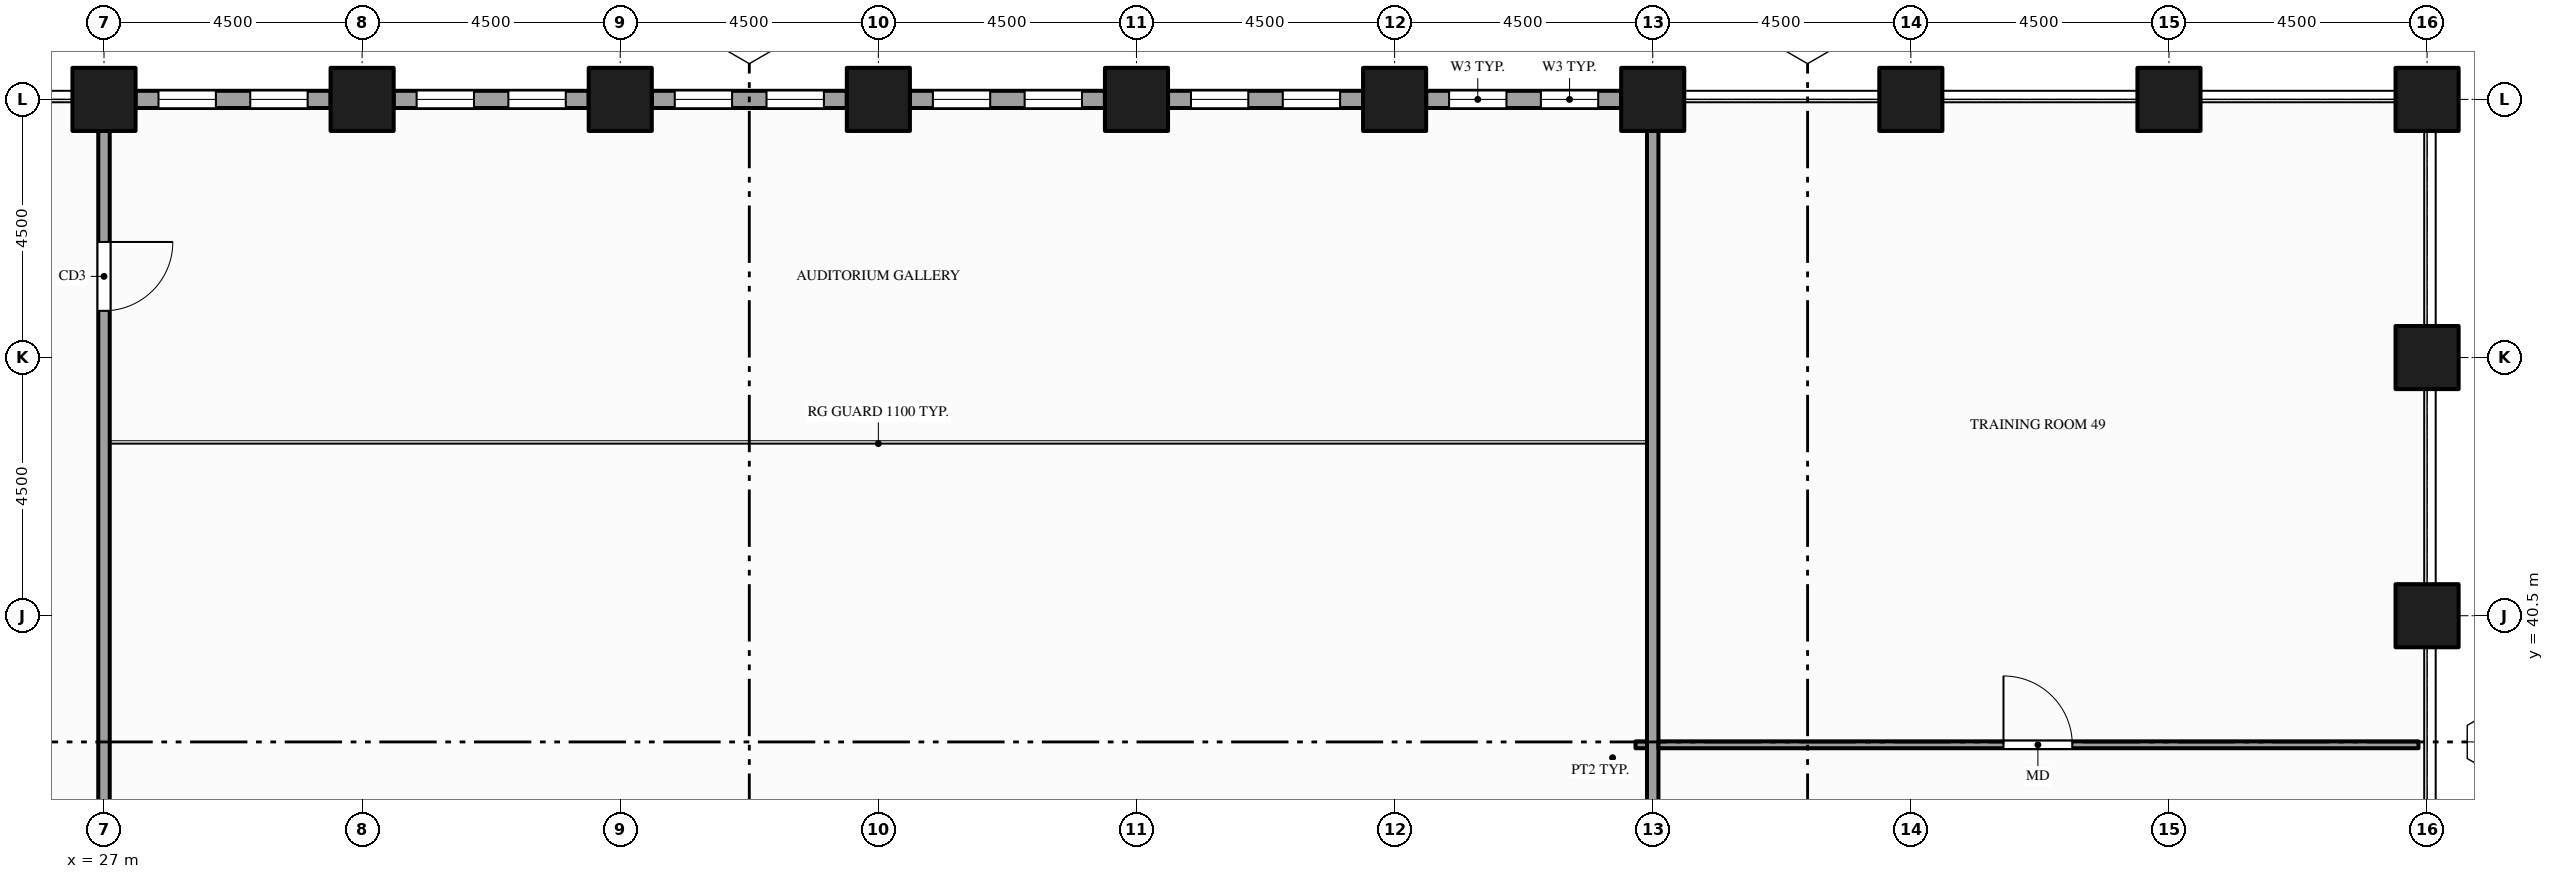
"""IFC4 building model, lengths in metres.
Left out: names, types, materials, properties, quantities, classifications, styles, units other than length and angle.
Written with IfcOpenShell. Run it as: python <this file> out.ifc"""

import sys

from ifc_helpers import new_model, si_unit, direction, frame, frame_2d, origin, origin_2d, place, context, subcontext, project, spatial, rectangle, hollow_rectangle, extrude, element, fill, save


model = new_model("IFC4")
c1 = context("Model", 3, precision=1e-05, world=origin(), true_north=direction((0.0, 1.0)))
c2 = subcontext(c1, "Body", "Model", "MODEL_VIEW")
j1 = project(units=[si_unit("LENGTHUNIT", "METRE"), si_unit("PLANEANGLEUNIT", "RADIAN")], contexts=[c1])
p1 = place(None, origin())
s1 = spatial("IfcSite", under=j1, at=p1, CompositionType="ELEMENT")
p2 = place(p1, origin())
s2 = spatial("IfcBuilding", under=s1, at=p2, CompositionType="ELEMENT")
p3 = place(p2, frame((0.0, 0.0, 14.0)))
s3 = spatial("IfcBuildingStorey", under=s2, at=p3, CompositionType="ELEMENT", Elevation=14.0)
for number, where, z_axis, x_axis in (
    (1, (27.0, 49.5, -0.25), (0.0, 0.0, 1.0), (1.0, 0.0, 0.0)),
    (2, (31.5, 49.5, -0.25), (0.0, 0.0, 1.0), (1.0, 0.0, 0.0)),
    (3, (36.0, 49.5, -0.25), (0.0, 0.0, 1.0), (1.0, 0.0, 0.0)),
    (4, (40.5, 49.5, -0.25), (0.0, 0.0, 1.0), (1.0, 0.0, 0.0)),
    (5, (45.0, 49.5, -0.25), (0.0, 0.0, 1.0), (1.0, 0.0, 0.0)),
    (6, (49.5, 49.5, -0.25), (0.0, 0.0, 1.0), (1.0, 0.0, 0.0)),
    (7, (54.0, 49.5, -0.25), (0.0, 0.0, 1.0), (1.0, 0.0, 0.0)),
    (8, (58.5, 49.5, -0.25), (0.0, 0.0, 1.0), (1.0, 0.0, 0.0)),
    (9, (63.0, 49.5, -0.25), (0.0, 0.0, 1.0), (1.0, 0.0, 0.0)),
    (10, (67.5, 40.5, -0.25), (0.0, 0.0, 1.0), (1.0, 0.0, 0.0)),
    (11, (67.5, 45.0, -0.25), (0.0, 0.0, 1.0), (1.0, 0.0, 0.0)),
    (12, (67.5, 49.5, -0.25), (0.0, 0.0, 1.0), (1.0, 0.0, 0.0)),
):
    element("IfcColumn", number, at=place(p3, frame(where, z_axis=z_axis, x_axis=x_axis)), inside=s3, PredefinedType="COLUMN", context=c2, shape_type="SweptSolid", body=[
        extrude(hollow_rectangle(XDim=1.1, YDim=1.1, WallThickness=0.06, at=origin_2d()), origin(), (0.0, 0.0, 1.0), 5.0),
    ])
p4 = place(p3, frame((53.45, 49.5, 0.0), z_axis=(0.0, 0.0, 1.0), x_axis=(-1.0, 0.0, 0.0)))
e13 = element("IfcWall", 13, at=p4, inside=s3, PredefinedType="STANDARD", context=c2, shape_type="SweptSolid", body=[
    extrude(rectangle(XDim=3.4, YDim=0.3, at=frame_2d((1.7, 0.0))), origin(), (0.0, 0.0, 1.0), 4.036),
])
p5 = place(p4, frame((0.4, 0.0, 0.9)))
e14 = element("IfcOpeningElement", 14, at=p5, cuts=e13, PredefinedType="OPENING", context=c2, shape_type="SweptSolid", body=[
    extrude(rectangle(XDim=1.0, YDim=2.75, at=frame_2d((0.5, 1.375))), frame((0.0, 0.16, 0.0), z_axis=(0.0, -1.0, 0.0), x_axis=(1.0, 0.0, 0.0)), (0.0, 0.0, 1.0), 0.32),
])
p6 = place(p4, frame((2.0, 0.0, 0.9)))
e15 = element("IfcOpeningElement", 15, at=p6, cuts=e13, PredefinedType="OPENING", context=c2, shape_type="SweptSolid", body=[
    extrude(rectangle(XDim=1.0, YDim=2.75, at=frame_2d((0.5, 1.375))), frame((0.0, 0.16, 0.0), z_axis=(0.0, -1.0, 0.0), x_axis=(1.0, 0.0, 0.0)), (0.0, 0.0, 1.0), 0.32),
])
p7 = place(p3, frame((48.95, 49.5, 0.0), z_axis=(0.0, 0.0, 1.0), x_axis=(-1.0, 0.0, 0.0)))
e16 = element("IfcWall", 16, at=p7, inside=s3, PredefinedType="STANDARD", context=c2, shape_type="SweptSolid", body=[
    extrude(rectangle(XDim=3.4, YDim=0.3, at=frame_2d((1.7, 0.0))), origin(), (0.0, 0.0, 1.0), 4.036),
])
p8 = place(p7, frame((0.4, 0.0, 0.9)))
e17 = element("IfcOpeningElement", 17, at=p8, cuts=e16, PredefinedType="OPENING", context=c2, shape_type="SweptSolid", body=[
    extrude(rectangle(XDim=1.0, YDim=2.75, at=frame_2d((0.5, 1.375))), frame((0.0, 0.16, 0.0), z_axis=(0.0, -1.0, 0.0), x_axis=(1.0, 0.0, 0.0)), (0.0, 0.0, 1.0), 0.32),
])
p9 = place(p7, frame((2.0, 0.0, 0.9)))
e18 = element("IfcOpeningElement", 18, at=p9, cuts=e16, PredefinedType="OPENING", context=c2, shape_type="SweptSolid", body=[
    extrude(rectangle(XDim=1.0, YDim=2.75, at=frame_2d((0.5, 1.375))), frame((0.0, 0.16, 0.0), z_axis=(0.0, -1.0, 0.0), x_axis=(1.0, 0.0, 0.0)), (0.0, 0.0, 1.0), 0.32),
])
p10 = place(p3, frame((44.45, 49.5, 0.0), z_axis=(0.0, 0.0, 1.0), x_axis=(-1.0, 0.0, 0.0)))
e19 = element("IfcWall", 19, at=p10, inside=s3, PredefinedType="STANDARD", context=c2, shape_type="SweptSolid", body=[
    extrude(rectangle(XDim=3.4, YDim=0.3, at=frame_2d((1.7, 0.0))), origin(), (0.0, 0.0, 1.0), 4.036),
])
p11 = place(p10, frame((0.4, 0.0, 0.9)))
e20 = element("IfcOpeningElement", 20, at=p11, cuts=e19, PredefinedType="OPENING", context=c2, shape_type="SweptSolid", body=[
    extrude(rectangle(XDim=1.0, YDim=2.75, at=frame_2d((0.5, 1.375))), frame((0.0, 0.16, 0.0), z_axis=(0.0, -1.0, 0.0), x_axis=(1.0, 0.0, 0.0)), (0.0, 0.0, 1.0), 0.32),
])
p12 = place(p10, frame((2.0, 0.0, 0.9)))
e21 = element("IfcOpeningElement", 21, at=p12, cuts=e19, PredefinedType="OPENING", context=c2, shape_type="SweptSolid", body=[
    extrude(rectangle(XDim=1.0, YDim=2.75, at=frame_2d((0.5, 1.375))), frame((0.0, 0.16, 0.0), z_axis=(0.0, -1.0, 0.0), x_axis=(1.0, 0.0, 0.0)), (0.0, 0.0, 1.0), 0.32),
])
p13 = place(p3, frame((39.95, 49.5, 0.0), z_axis=(0.0, 0.0, 1.0), x_axis=(-1.0, 0.0, 0.0)))
e22 = element("IfcWall", 22, at=p13, inside=s3, PredefinedType="STANDARD", context=c2, shape_type="SweptSolid", body=[
    extrude(rectangle(XDim=3.4, YDim=0.3, at=frame_2d((1.7, 0.0))), origin(), (0.0, 0.0, 1.0), 4.036),
])
p14 = place(p13, frame((0.4, 0.0, 0.9)))
e23 = element("IfcOpeningElement", 23, at=p14, cuts=e22, PredefinedType="OPENING", context=c2, shape_type="SweptSolid", body=[
    extrude(rectangle(XDim=1.0, YDim=2.75, at=frame_2d((0.5, 1.375))), frame((0.0, 0.16, 0.0), z_axis=(0.0, -1.0, 0.0), x_axis=(1.0, 0.0, 0.0)), (0.0, 0.0, 1.0), 0.32),
])
p15 = place(p13, frame((2.0, 0.0, 0.9)))
e24 = element("IfcOpeningElement", 24, at=p15, cuts=e22, PredefinedType="OPENING", context=c2, shape_type="SweptSolid", body=[
    extrude(rectangle(XDim=1.0, YDim=2.75, at=frame_2d((0.5, 1.375))), frame((0.0, 0.16, 0.0), z_axis=(0.0, -1.0, 0.0), x_axis=(1.0, 0.0, 0.0)), (0.0, 0.0, 1.0), 0.32),
])
p16 = place(p3, frame((35.45, 49.5, 0.0), z_axis=(0.0, 0.0, 1.0), x_axis=(-1.0, 0.0, 0.0)))
e25 = element("IfcWall", 25, at=p16, inside=s3, PredefinedType="STANDARD", context=c2, shape_type="SweptSolid", body=[
    extrude(rectangle(XDim=3.4, YDim=0.3, at=frame_2d((1.7, 0.0))), origin(), (0.0, 0.0, 1.0), 4.036),
])
p17 = place(p16, frame((0.4, 0.0, 0.9)))
e26 = element("IfcOpeningElement", 26, at=p17, cuts=e25, PredefinedType="OPENING", context=c2, shape_type="SweptSolid", body=[
    extrude(rectangle(XDim=1.0, YDim=2.75, at=frame_2d((0.5, 1.375))), frame((0.0, 0.16, 0.0), z_axis=(0.0, -1.0, 0.0), x_axis=(1.0, 0.0, 0.0)), (0.0, 0.0, 1.0), 0.32),
])
p18 = place(p16, frame((2.0, 0.0, 0.9)))
e27 = element("IfcOpeningElement", 27, at=p18, cuts=e25, PredefinedType="OPENING", context=c2, shape_type="SweptSolid", body=[
    extrude(rectangle(XDim=1.0, YDim=2.75, at=frame_2d((0.5, 1.375))), frame((0.0, 0.16, 0.0), z_axis=(0.0, -1.0, 0.0), x_axis=(1.0, 0.0, 0.0)), (0.0, 0.0, 1.0), 0.32),
])
p19 = place(p3, frame((30.95, 49.5, 0.0), z_axis=(0.0, 0.0, 1.0), x_axis=(-1.0, 0.0, 0.0)))
e28 = element("IfcWall", 28, at=p19, inside=s3, PredefinedType="STANDARD", context=c2, shape_type="SweptSolid", body=[
    extrude(rectangle(XDim=3.4, YDim=0.3, at=frame_2d((1.7, 0.0))), origin(), (0.0, 0.0, 1.0), 4.036),
])
p20 = place(p19, frame((0.4, 0.0, 0.9)))
e29 = element("IfcOpeningElement", 29, at=p20, cuts=e28, PredefinedType="OPENING", context=c2, shape_type="SweptSolid", body=[
    extrude(rectangle(XDim=1.0, YDim=2.75, at=frame_2d((0.5, 1.375))), frame((0.0, 0.16, 0.0), z_axis=(0.0, -1.0, 0.0), x_axis=(1.0, 0.0, 0.0)), (0.0, 0.0, 1.0), 0.32),
])
p21 = place(p19, frame((2.0, 0.0, 0.9)))
e30 = element("IfcOpeningElement", 30, at=p21, cuts=e28, PredefinedType="OPENING", context=c2, shape_type="SweptSolid", body=[
    extrude(rectangle(XDim=1.0, YDim=2.75, at=frame_2d((0.5, 1.375))), frame((0.0, 0.16, 0.0), z_axis=(0.0, -1.0, 0.0), x_axis=(1.0, 0.0, 0.0)), (0.0, 0.0, 1.0), 0.32),
])
p22 = place(p3, frame((27.0, 26.7, 0.0), z_axis=(0.0, 0.0, 1.0), x_axis=(0.0, 1.0, 0.0)))
e31 = element("IfcWall", 31, at=p22, inside=s3, PredefinedType="PARTITIONING", context=c2, shape_type="SweptSolid", body=[
    extrude(rectangle(XDim=22.65, YDim=0.2, at=frame_2d((11.325, 0.0))), origin(), (0.0, 0.0, 1.0), 3.66),
])
p23 = place(p22, frame((19.115, 0.0, 0.0)))
e32 = element("IfcOpeningElement", 32, at=p23, cuts=e31, PredefinedType="OPENING", context=c2, shape_type="SweptSolid", body=[
    extrude(rectangle(XDim=1.2, YDim=2.1, at=frame_2d((0.6, 1.05))), frame((0.0, 0.11, 0.0), z_axis=(0.0, -1.0, 0.0), x_axis=(1.0, 0.0, 0.0)), (0.0, 0.0, 1.0), 0.22),
])
p24 = place(p3, frame((54.0, 26.7, 0.0), z_axis=(0.0, 0.0, 1.0), x_axis=(0.0, 1.0, 0.0)))
e33 = element("IfcWall", 33, at=p24, inside=s3, PredefinedType="PARTITIONING", context=c2, shape_type="SweptSolid", body=[
    extrude(rectangle(XDim=22.65, YDim=0.2, at=frame_2d((11.325, 0.0))), origin(), (0.0, 0.0, 1.0), 3.66),
])
p25 = place(p3, frame((53.7, 38.25, 0.0), z_axis=(0.0, 0.0, 1.0), x_axis=(1.0, 0.0, 0.0)))
e34 = element("IfcWall", 34, at=p25, inside=s3, PredefinedType="PARTITIONING", context=c2, shape_type="SweptSolid", body=[
    extrude(rectangle(XDim=0.2, YDim=0.12, at=frame_2d((0.1, 0.0))), origin(), (0.0, 0.0, 1.0), 3.66),
])
p26 = place(p3, frame((54.1, 38.25, 0.0), z_axis=(0.0, 0.0, 1.0), x_axis=(1.0, 0.0, 0.0)))
e35 = element("IfcWall", 35, at=p26, inside=s3, PredefinedType="PARTITIONING", context=c2, shape_type="SweptSolid", body=[
    extrude(rectangle(XDim=13.25, YDim=0.12, at=frame_2d((6.625, 0.0))), origin(), (0.0, 0.0, 1.0), 3.66),
])
p27 = place(p26, frame((6.015, 0.0, 0.0)))
e36 = element("IfcOpeningElement", 36, at=p27, cuts=e35, PredefinedType="OPENING", context=c2, shape_type="SweptSolid", body=[
    extrude(rectangle(XDim=1.2, YDim=2.1, at=frame_2d((0.6, 1.05))), frame((0.0, 0.07, 0.0), z_axis=(0.0, -1.0, 0.0), x_axis=(1.0, 0.0, 0.0)), (0.0, 0.0, 1.0), 0.14),
])
p28 = place(p5, origin())
e37 = element("IfcWindow", 37, at=p28, inside=s3, PartitioningType="SINGLE_PANEL", PredefinedType="WINDOW", context=c2, shape_type="SweptSolid", body=[
    extrude(rectangle(XDim=1.0, YDim=2.75, at=frame_2d((0.5, 1.375))), frame((0.0, 0.03, 0.0), z_axis=(0.0, -1.0, 0.0), x_axis=(1.0, 0.0, 0.0)), (0.0, 0.0, 1.0), 0.06),
])
fill(e14, e37)
p29 = place(p6, origin())
e38 = element("IfcWindow", 38, at=p29, inside=s3, PartitioningType="SINGLE_PANEL", PredefinedType="WINDOW", context=c2, shape_type="SweptSolid", body=[
    extrude(rectangle(XDim=1.0, YDim=2.75, at=frame_2d((0.5, 1.375))), frame((0.0, 0.03, 0.0), z_axis=(0.0, -1.0, 0.0), x_axis=(1.0, 0.0, 0.0)), (0.0, 0.0, 1.0), 0.06),
])
fill(e15, e38)
p30 = place(p8, origin())
e39 = element("IfcWindow", 39, at=p30, inside=s3, PartitioningType="SINGLE_PANEL", PredefinedType="WINDOW", context=c2, shape_type="SweptSolid", body=[
    extrude(rectangle(XDim=1.0, YDim=2.75, at=frame_2d((0.5, 1.375))), frame((0.0, 0.03, 0.0), z_axis=(0.0, -1.0, 0.0), x_axis=(1.0, 0.0, 0.0)), (0.0, 0.0, 1.0), 0.06),
])
fill(e17, e39)
p31 = place(p9, origin())
e40 = element("IfcWindow", 40, at=p31, inside=s3, PartitioningType="SINGLE_PANEL", PredefinedType="WINDOW", context=c2, shape_type="SweptSolid", body=[
    extrude(rectangle(XDim=1.0, YDim=2.75, at=frame_2d((0.5, 1.375))), frame((0.0, 0.03, 0.0), z_axis=(0.0, -1.0, 0.0), x_axis=(1.0, 0.0, 0.0)), (0.0, 0.0, 1.0), 0.06),
])
fill(e18, e40)
p32 = place(p11, origin())
e41 = element("IfcWindow", 41, at=p32, inside=s3, PartitioningType="SINGLE_PANEL", PredefinedType="WINDOW", context=c2, shape_type="SweptSolid", body=[
    extrude(rectangle(XDim=1.0, YDim=2.75, at=frame_2d((0.5, 1.375))), frame((0.0, 0.03, 0.0), z_axis=(0.0, -1.0, 0.0), x_axis=(1.0, 0.0, 0.0)), (0.0, 0.0, 1.0), 0.06),
])
fill(e20, e41)
p33 = place(p12, origin())
e42 = element("IfcWindow", 42, at=p33, inside=s3, PartitioningType="SINGLE_PANEL", PredefinedType="WINDOW", context=c2, shape_type="SweptSolid", body=[
    extrude(rectangle(XDim=1.0, YDim=2.75, at=frame_2d((0.5, 1.375))), frame((0.0, 0.03, 0.0), z_axis=(0.0, -1.0, 0.0), x_axis=(1.0, 0.0, 0.0)), (0.0, 0.0, 1.0), 0.06),
])
fill(e21, e42)
p34 = place(p14, origin())
e43 = element("IfcWindow", 43, at=p34, inside=s3, PartitioningType="SINGLE_PANEL", PredefinedType="WINDOW", context=c2, shape_type="SweptSolid", body=[
    extrude(rectangle(XDim=1.0, YDim=2.75, at=frame_2d((0.5, 1.375))), frame((0.0, 0.03, 0.0), z_axis=(0.0, -1.0, 0.0), x_axis=(1.0, 0.0, 0.0)), (0.0, 0.0, 1.0), 0.06),
])
fill(e23, e43)
p35 = place(p15, origin())
e44 = element("IfcWindow", 44, at=p35, inside=s3, PartitioningType="SINGLE_PANEL", PredefinedType="WINDOW", context=c2, shape_type="SweptSolid", body=[
    extrude(rectangle(XDim=1.0, YDim=2.75, at=frame_2d((0.5, 1.375))), frame((0.0, 0.03, 0.0), z_axis=(0.0, -1.0, 0.0), x_axis=(1.0, 0.0, 0.0)), (0.0, 0.0, 1.0), 0.06),
])
fill(e24, e44)
p36 = place(p17, origin())
e45 = element("IfcWindow", 45, at=p36, inside=s3, PartitioningType="SINGLE_PANEL", PredefinedType="WINDOW", context=c2, shape_type="SweptSolid", body=[
    extrude(rectangle(XDim=1.0, YDim=2.75, at=frame_2d((0.5, 1.375))), frame((0.0, 0.03, 0.0), z_axis=(0.0, -1.0, 0.0), x_axis=(1.0, 0.0, 0.0)), (0.0, 0.0, 1.0), 0.06),
])
fill(e26, e45)
p37 = place(p18, origin())
e46 = element("IfcWindow", 46, at=p37, inside=s3, PartitioningType="SINGLE_PANEL", PredefinedType="WINDOW", context=c2, shape_type="SweptSolid", body=[
    extrude(rectangle(XDim=1.0, YDim=2.75, at=frame_2d((0.5, 1.375))), frame((0.0, 0.03, 0.0), z_axis=(0.0, -1.0, 0.0), x_axis=(1.0, 0.0, 0.0)), (0.0, 0.0, 1.0), 0.06),
])
fill(e27, e46)
p38 = place(p20, origin())
e47 = element("IfcWindow", 47, at=p38, inside=s3, PartitioningType="SINGLE_PANEL", PredefinedType="WINDOW", context=c2, shape_type="SweptSolid", body=[
    extrude(rectangle(XDim=1.0, YDim=2.75, at=frame_2d((0.5, 1.375))), frame((0.0, 0.03, 0.0), z_axis=(0.0, -1.0, 0.0), x_axis=(1.0, 0.0, 0.0)), (0.0, 0.0, 1.0), 0.06),
])
fill(e29, e47)
p39 = place(p21, origin())
e48 = element("IfcWindow", 48, at=p39, inside=s3, PartitioningType="SINGLE_PANEL", PredefinedType="WINDOW", context=c2, shape_type="SweptSolid", body=[
    extrude(rectangle(XDim=1.0, YDim=2.75, at=frame_2d((0.5, 1.375))), frame((0.0, 0.03, 0.0), z_axis=(0.0, -1.0, 0.0), x_axis=(1.0, 0.0, 0.0)), (0.0, 0.0, 1.0), 0.06),
])
fill(e30, e48)
p40 = place(p23, origin())
e49 = element("IfcDoor", 49, at=p40, inside=s3, OperationType="SINGLE_SWING_RIGHT", PredefinedType="DOOR", context=c2, shape_type="SweptSolid", body=[
    extrude(rectangle(XDim=1.2, YDim=2.1, at=frame_2d((0.6, 1.05))), frame((0.0, 0.025, 0.0), z_axis=(0.0, -1.0, 0.0), x_axis=(1.0, 0.0, 0.0)), (0.0, 0.0, 1.0), 0.05),
])
fill(e32, e49)
p41 = place(p27, origin())
e50 = element("IfcDoor", 50, at=p41, inside=s3, OperationType="SINGLE_SWING_LEFT", PredefinedType="DOOR", context=c2, shape_type="SweptSolid", body=[
    extrude(rectangle(XDim=1.2, YDim=2.1, at=frame_2d((0.6, 1.05))), frame((0.0, 0.025, 0.0), z_axis=(0.0, -1.0, 0.0), x_axis=(1.0, 0.0, 0.0)), (0.0, 0.0, 1.0), 0.05),
])
fill(e36, e50)
save(model, sys.argv[1])
